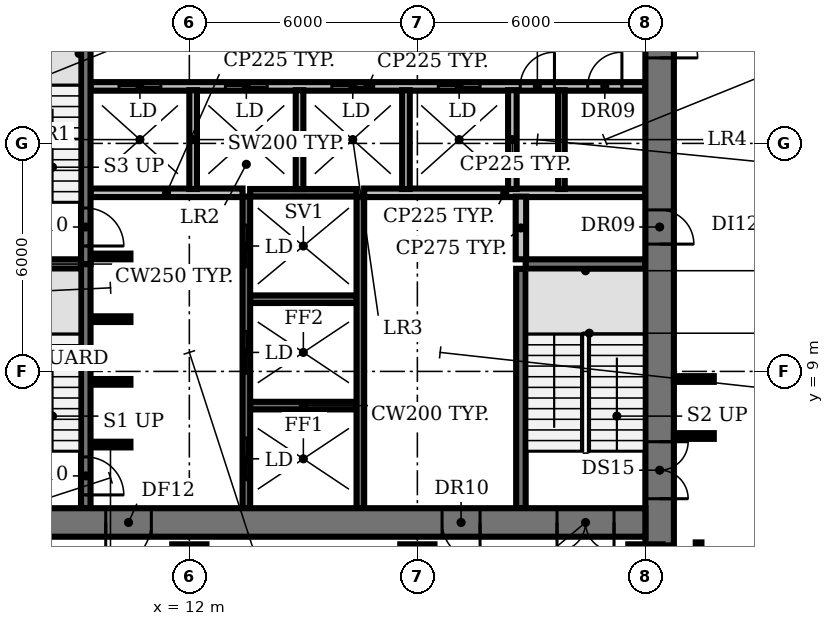
"""IFC4 building model, lengths in metres.
Left out: names, types, materials, properties, quantities, classifications, styles, units other than length and angle.
Written with IfcOpenShell. Run it as: python <this file> out.ifc"""

import sys

from ifc_helpers import new_model, si_unit, direction, frame, frame_2d, origin, origin_2d, place, context, subcontext, project, spatial, rectangle, extrude, element, fill, save


model = new_model("IFC4")
c1 = context("Model", 3, precision=1e-05, world=origin(), true_north=direction((0.0, 1.0)))
c2 = subcontext(c1, "Body", "Model", "MODEL_VIEW")
j1 = project(units=[si_unit("LENGTHUNIT", "METRE"), si_unit("PLANEANGLEUNIT", "RADIAN")], contexts=[c1])
p1 = place(None, origin())
s1 = spatial("IfcSite", under=j1, at=p1, CompositionType="ELEMENT")
p2 = place(p1, origin())
s2 = spatial("IfcBuilding", under=s1, at=p2, CompositionType="ELEMENT")
p3 = place(p2, frame((0.0, 0.0, 108.8)))
s3 = spatial("IfcBuildingStorey", under=s2, at=p3, CompositionType="ELEMENT", Elevation=108.8)
for number, where, z_axis, x_axis in (
    (1, (12.0, 4.0, 0.0), (0.0, 0.0, 1.0), (1.0, 0.0, 0.0)),
    (2, (18.0, 4.0, 0.0), (0.0, 0.0, 1.0), (1.0, 0.0, 0.0)),
    (3, (24.0, 4.0, 0.0), (0.0, 0.0, 1.0), (1.0, 0.0, 0.0)),
):
    element("IfcColumn", number, at=place(p3, frame(where, z_axis=z_axis, x_axis=x_axis)), inside=s3, PredefinedType="COLUMN", context=c2, shape_type="SweptSolid", body=[
        extrude(rectangle(XDim=0.9, YDim=0.9, at=origin_2d()), origin(), (0.0, 0.0, 1.0), 3.85),
    ])
p4 = place(p3, frame((9.4, 7.075, 0.0), z_axis=(0.0, 0.0, 1.0), x_axis=(1.0, 0.0, 0.0)))
e4 = element("IfcWall", 4, at=p4, inside=s3, PredefinedType="SHEAR", context=c2, shape_type="SweptSolid", body=[
    extrude(rectangle(XDim=1.05, YDim=0.15, at=frame_2d((0.525, 0.0))), origin(), (0.0, 0.0, 1.0), 3.85),
])
p5 = place(p3, frame((13.6, 8.1, 0.0), z_axis=(0.0, 0.0, 1.0), x_axis=(1.0, 0.0, 0.0)))
e5 = element("IfcWall", 5, at=p5, inside=s3, PredefinedType="SHEAR", context=c2, shape_type="SweptSolid", body=[
    extrude(rectangle(XDim=2.8, YDim=0.2, at=frame_2d((1.4, 0.0))), origin(), (0.0, 0.0, 1.0), 3.85),
])
for number, where, z_axis, x_axis in (
    (6, (9.4, 8.725, 0.0), (0.0, 0.0, 1.0), (1.0, 0.0, 0.0)),
    (7, (9.4, 10.375, 0.0), (0.0, 0.0, 1.0), (1.0, 0.0, 0.0)),
):
    element("IfcWall", number, at=place(p3, frame(where, z_axis=z_axis, x_axis=x_axis)), inside=s3, PredefinedType="SHEAR", context=c2, shape_type="SweptSolid", body=[
        extrude(rectangle(XDim=1.05, YDim=0.15, at=frame_2d((0.525, 0.0))), origin(), (0.0, 0.0, 1.0), 3.85),
    ])
p6 = place(p3, frame((13.6, 10.9, 0.0), z_axis=(0.0, 0.0, 1.0), x_axis=(1.0, 0.0, 0.0)))
e8 = element("IfcWall", 8, at=p6, inside=s3, PredefinedType="SHEAR", context=c2, shape_type="SweptSolid", body=[
    extrude(rectangle(XDim=2.8, YDim=0.2, at=frame_2d((1.4, 0.0))), origin(), (0.0, 0.0, 1.0), 3.85),
])
for number, where, z_axis, x_axis in (
    (9, (6.0, 11.825, 0.0), (0.0, 0.0, 1.0), (1.0, 0.0, 0.0)),
    (10, (20.85, 11.825, 0.0), (0.0, 0.0, 1.0), (1.0, 0.0, 0.0)),
):
    element("IfcWall", number, at=place(p3, frame(where, z_axis=z_axis, x_axis=x_axis)), inside=s3, PredefinedType="SHEAR", context=c2, shape_type="SweptSolid", body=[
        extrude(rectangle(XDim=3.15, YDim=0.25, at=frame_2d((1.575, 0.0))), origin(), (0.0, 0.0, 1.0), 3.85),
    ])
p7 = place(p3, frame((9.4, 12.025, 0.0), z_axis=(0.0, 0.0, 1.0), x_axis=(1.0, 0.0, 0.0)))
e11 = element("IfcWall", 11, at=p7, inside=s3, PredefinedType="SHEAR", context=c2, shape_type="SweptSolid", body=[
    extrude(rectangle(XDim=1.05, YDim=0.15, at=frame_2d((0.525, 0.0))), origin(), (0.0, 0.0, 1.0), 3.85),
])
p8 = place(p3, frame((9.4, 13.7, 0.0), z_axis=(0.0, 0.0, 1.0), x_axis=(1.0, 0.0, 0.0)))
e12 = element("IfcWall", 12, at=p8, inside=s3, PredefinedType="PARTITIONING", context=c2, shape_type="SweptSolid", body=[
    extrude(rectangle(XDim=4.0, YDim=0.225, at=frame_2d((2.0, 0.0))), origin(), (0.0, 0.0, 1.0), 3.85),
])
p9 = place(p3, frame((13.6, 13.7, 0.0), z_axis=(0.0, 0.0, 1.0), x_axis=(1.0, 0.0, 0.0)))
e13 = element("IfcWall", 13, at=p9, inside=s3, PredefinedType="SHEAR", context=c2, shape_type="SweptSolid", body=[
    extrude(rectangle(XDim=2.8, YDim=0.2, at=frame_2d((1.4, 0.0))), origin(), (0.0, 0.0, 1.0), 3.85),
])
p10 = place(p3, frame((16.6, 13.7, 0.0), z_axis=(0.0, 0.0, 1.0), x_axis=(1.0, 0.0, 0.0)))
e14 = element("IfcWall", 14, at=p10, inside=s3, PredefinedType="PARTITIONING", context=c2, shape_type="SweptSolid", body=[
    extrude(rectangle(XDim=7.4, YDim=0.225, at=frame_2d((3.7, 0.0))), origin(), (0.0, 0.0, 1.0), 3.85),
])
p11 = place(p3, frame((9.4, 16.5, 0.0), z_axis=(0.0, 0.0, 1.0), x_axis=(1.0, 0.0, 0.0)))
e15 = element("IfcWall", 15, at=p11, inside=s3, PredefinedType="PARTITIONING", context=c2, shape_type="SweptSolid", body=[
    extrude(rectangle(XDim=14.6, YDim=0.225, at=frame_2d((7.3, 0.0))), origin(), (0.0, 0.0, 1.0), 3.85),
])
p12 = place(p11, frame((0.75, 0.0, 0.0)))
e16 = element("IfcOpeningElement", 16, at=p12, cuts=e15, PredefinedType="OPENING", context=c2, shape_type="SweptSolid", body=[
    extrude(rectangle(XDim=1.1, YDim=2.1, at=frame_2d((0.55, 1.05))), frame((0.0, 0.123, 0.0), z_axis=(0.0, -1.0, 0.0), x_axis=(1.0, 0.0, 0.0)), (0.0, 0.0, 1.0), 0.245),
])
p13 = place(p11, frame((3.55, 0.0, 0.0)))
e17 = element("IfcOpeningElement", 17, at=p13, cuts=e15, PredefinedType="OPENING", context=c2, shape_type="SweptSolid", body=[
    extrude(rectangle(XDim=1.1, YDim=2.1, at=frame_2d((0.55, 1.05))), frame((0.0, 0.123, 0.0), z_axis=(0.0, -1.0, 0.0), x_axis=(1.0, 0.0, 0.0)), (0.0, 0.0, 1.0), 0.245),
])
p14 = place(p11, frame((6.35, 0.0, 0.0)))
e18 = element("IfcOpeningElement", 18, at=p14, cuts=e15, PredefinedType="OPENING", context=c2, shape_type="SweptSolid", body=[
    extrude(rectangle(XDim=1.1, YDim=2.1, at=frame_2d((0.55, 1.05))), frame((0.0, 0.123, 0.0), z_axis=(0.0, -1.0, 0.0), x_axis=(1.0, 0.0, 0.0)), (0.0, 0.0, 1.0), 0.245),
])
p15 = place(p11, frame((9.15, 0.0, 0.0)))
e19 = element("IfcOpeningElement", 19, at=p15, cuts=e15, PredefinedType="OPENING", context=c2, shape_type="SweptSolid", body=[
    extrude(rectangle(XDim=1.1, YDim=2.1, at=frame_2d((0.55, 1.05))), frame((0.0, 0.123, 0.0), z_axis=(0.0, -1.0, 0.0), x_axis=(1.0, 0.0, 0.0)), (0.0, 0.0, 1.0), 0.245),
])
p16 = place(p11, frame((11.308, 0.0, 0.0)))
e20 = element("IfcOpeningElement", 20, at=p16, cuts=e15, PredefinedType="OPENING", context=c2, shape_type="SweptSolid", body=[
    extrude(rectangle(XDim=0.9, YDim=2.1, at=frame_2d((0.45, 1.05))), frame((0.0, 0.123, 0.0), z_axis=(0.0, -1.0, 0.0), x_axis=(1.0, 0.0, 0.0)), (0.0, 0.0, 1.0), 0.245),
])
p17 = place(p11, frame((13.083, 0.0, 0.0)))
e21 = element("IfcOpeningElement", 21, at=p17, cuts=e15, PredefinedType="OPENING", context=c2, shape_type="SweptSolid", body=[
    extrude(rectangle(XDim=0.9, YDim=2.1, at=frame_2d((0.45, 1.05))), frame((0.0, 0.123, 0.0), z_axis=(0.0, -1.0, 0.0), x_axis=(1.0, 0.0, 0.0)), (0.0, 0.0, 1.0), 0.245),
])
p18 = place(p3, frame((9.275, 11.825, 0.0), z_axis=(0.0, 0.0, 1.0), x_axis=(0.0, -1.0, 0.0)))
e22 = element("IfcWall", 22, at=p18, inside=s3, PredefinedType="SHEAR", context=c2, shape_type="SweptSolid", body=[
    extrude(rectangle(XDim=6.425, YDim=0.25, at=frame_2d((3.212, 0.0))), origin(), (0.0, 0.0, 1.0), 3.85),
])
p19 = place(p18, frame((5.075, 0.0, 0.0)))
e23 = element("IfcOpeningElement", 23, at=p19, cuts=e22, PredefinedType="OPENING", context=c2, shape_type="SweptSolid", body=[
    extrude(rectangle(XDim=1.0, YDim=2.1, at=frame_2d((0.5, 1.05))), frame((0.0, 0.135, 0.0), z_axis=(0.0, -1.0, 0.0), x_axis=(1.0, 0.0, 0.0)), (0.0, 0.0, 1.0), 0.27),
])
p20 = place(p3, frame((9.275, 18.375, 0.0), z_axis=(0.0, 0.0, 1.0), x_axis=(0.0, -1.0, 0.0)))
e24 = element("IfcWall", 24, at=p20, inside=s3, PredefinedType="SHEAR", context=c2, shape_type="SweptSolid", body=[
    extrude(rectangle(XDim=6.55, YDim=0.25, at=frame_2d((3.275, 0.0))), origin(), (0.0, 0.0, 1.0), 3.85),
])
p21 = place(p20, frame((5.075, 0.0, 0.0)))
e25 = element("IfcOpeningElement", 25, at=p21, cuts=e24, PredefinedType="OPENING", context=c2, shape_type="SweptSolid", body=[
    extrude(rectangle(XDim=1.0, YDim=2.1, at=frame_2d((0.5, 1.05))), frame((0.0, 0.135, 0.0), z_axis=(0.0, -1.0, 0.0), x_axis=(1.0, 0.0, 0.0)), (0.0, 0.0, 1.0), 0.27),
])
p22 = place(p3, frame((12.1, 13.8, 0.0), z_axis=(0.0, 0.0, 1.0), x_axis=(0.0, 1.0, 0.0)))
e26 = element("IfcWall", 26, at=p22, inside=s3, PredefinedType="SOLIDWALL", context=c2, shape_type="SweptSolid", body=[
    extrude(rectangle(XDim=2.6, YDim=0.2, at=frame_2d((1.3, 0.0))), origin(), (0.0, 0.0, 1.0), 3.85),
])
p23 = place(p3, frame((13.5, 5.4, 0.0), z_axis=(0.0, 0.0, 1.0), x_axis=(0.0, 1.0, 0.0)))
e27 = element("IfcWall", 27, at=p23, inside=s3, PredefinedType="SHEAR", context=c2, shape_type="SweptSolid", body=[
    extrude(rectangle(XDim=8.2, YDim=0.2, at=frame_2d((4.1, 0.0))), origin(), (0.0, 0.0, 1.0), 3.85),
])
p24 = place(p23, frame((0.75, 0.0, 0.0)))
e28 = element("IfcOpeningElement", 28, at=p24, cuts=e27, PredefinedType="OPENING", context=c2, shape_type="SweptSolid", body=[
    extrude(rectangle(XDim=1.1, YDim=2.1, at=frame_2d((0.55, 1.05))), frame((0.0, 0.11, 0.0), z_axis=(0.0, -1.0, 0.0), x_axis=(1.0, 0.0, 0.0)), (0.0, 0.0, 1.0), 0.22),
])
p25 = place(p23, frame((3.55, 0.0, 0.0)))
e29 = element("IfcOpeningElement", 29, at=p25, cuts=e27, PredefinedType="OPENING", context=c2, shape_type="SweptSolid", body=[
    extrude(rectangle(XDim=1.1, YDim=2.1, at=frame_2d((0.55, 1.05))), frame((0.0, 0.11, 0.0), z_axis=(0.0, -1.0, 0.0), x_axis=(1.0, 0.0, 0.0)), (0.0, 0.0, 1.0), 0.22),
])
p26 = place(p23, frame((6.35, 0.0, 0.0)))
e30 = element("IfcOpeningElement", 30, at=p26, cuts=e27, PredefinedType="OPENING", context=c2, shape_type="SweptSolid", body=[
    extrude(rectangle(XDim=1.1, YDim=2.1, at=frame_2d((0.55, 1.05))), frame((0.0, 0.11, 0.0), z_axis=(0.0, -1.0, 0.0), x_axis=(1.0, 0.0, 0.0)), (0.0, 0.0, 1.0), 0.22),
])
p27 = place(p3, frame((14.9, 13.8, 0.0), z_axis=(0.0, 0.0, 1.0), x_axis=(0.0, 1.0, 0.0)))
e31 = element("IfcWall", 31, at=p27, inside=s3, PredefinedType="SOLIDWALL", context=c2, shape_type="SweptSolid", body=[
    extrude(rectangle(XDim=2.6, YDim=0.2, at=frame_2d((1.3, 0.0))), origin(), (0.0, 0.0, 1.0), 3.85),
])
p28 = place(p3, frame((16.5, 5.4, 0.0), z_axis=(0.0, 0.0, 1.0), x_axis=(0.0, 1.0, 0.0)))
e32 = element("IfcWall", 32, at=p28, inside=s3, PredefinedType="SHEAR", context=c2, shape_type="SweptSolid", body=[
    extrude(rectangle(XDim=8.2, YDim=0.2, at=frame_2d((4.1, 0.0))), origin(), (0.0, 0.0, 1.0), 3.85),
])
p29 = place(p3, frame((17.7, 13.8, 0.0), z_axis=(0.0, 0.0, 1.0), x_axis=(0.0, 1.0, 0.0)))
e33 = element("IfcWall", 33, at=p29, inside=s3, PredefinedType="SOLIDWALL", context=c2, shape_type="SweptSolid", body=[
    extrude(rectangle(XDim=2.6, YDim=0.2, at=frame_2d((1.3, 0.0))), origin(), (0.0, 0.0, 1.0), 3.85),
])
p30 = place(p3, frame((20.5, 13.8, 0.0), z_axis=(0.0, 0.0, 1.0), x_axis=(0.0, 1.0, 0.0)))
e34 = element("IfcWall", 34, at=p30, inside=s3, PredefinedType="PARTITIONING", context=c2, shape_type="SweptSolid", body=[
    extrude(rectangle(XDim=2.6, YDim=0.225, at=frame_2d((1.3, 0.0))), origin(), (0.0, 0.0, 1.0), 3.85),
])
p31 = place(p3, frame((20.725, 5.4, 0.0), z_axis=(0.0, 0.0, 1.0), x_axis=(0.0, 1.0, 0.0)))
e35 = element("IfcWall", 35, at=p31, inside=s3, PredefinedType="SHEAR", context=c2, shape_type="SweptSolid", body=[
    extrude(rectangle(XDim=6.3, YDim=0.25, at=frame_2d((3.15, 0.0))), origin(), (0.0, 0.0, 1.0), 3.85),
])
p32 = place(p3, frame((20.725, 11.95, 0.0), z_axis=(0.0, 0.0, 1.0), x_axis=(0.0, 1.0, 0.0)))
e36 = element("IfcWall", 36, at=p32, inside=s3, PredefinedType="PARTITIONING", context=c2, shape_type="SweptSolid", body=[
    extrude(rectangle(XDim=1.65, YDim=0.275, at=frame_2d((0.825, 0.0))), origin(), (0.0, 0.0, 1.0), 3.85),
])
p33 = place(p3, frame((21.79, 13.8, 0.0), z_axis=(0.0, 0.0, 1.0), x_axis=(0.0, 1.0, 0.0)))
e37 = element("IfcWall", 37, at=p33, inside=s3, PredefinedType="PARTITIONING", context=c2, shape_type="SweptSolid", body=[
    extrude(rectangle(XDim=2.6, YDim=0.175, at=frame_2d((1.3, 0.0))), origin(), (0.0, 0.0, 1.0), 3.85),
])
p34 = place(p3, frame((24.375, 25.55, 0.0), z_axis=(0.0, 0.0, 1.0), x_axis=(0.0, -1.0, 0.0)))
e38 = element("IfcWall", 38, at=p34, inside=s3, PredefinedType="SHEAR", context=c2, shape_type="SweptSolid", body=[
    extrude(rectangle(XDim=21.13, YDim=0.75, at=frame_2d((10.565, 0.0))), origin(), (0.0, 0.0, 1.0), 3.85),
])
p35 = place(p34, frame((18.4, 0.0, 0.0)))
e39 = element("IfcOpeningElement", 39, at=p35, cuts=e38, PredefinedType="OPENING", context=c2, shape_type="SweptSolid", body=[
    extrude(rectangle(XDim=1.5, YDim=2.1, at=frame_2d((0.75, 1.05))), frame((0.0, 0.385, 0.0), z_axis=(0.0, -1.0, 0.0), x_axis=(1.0, 0.0, 0.0)), (0.0, 0.0, 1.0), 0.77),
])
p36 = place(p34, frame((12.3, 0.0, 0.0)))
e40 = element("IfcOpeningElement", 40, at=p36, cuts=e38, PredefinedType="OPENING", context=c2, shape_type="SweptSolid", body=[
    extrude(rectangle(XDim=0.9, YDim=2.1, at=frame_2d((0.45, 1.05))), frame((0.0, 0.385, 0.0), z_axis=(0.0, -1.0, 0.0), x_axis=(1.0, 0.0, 0.0)), (0.0, 0.0, 1.0), 0.77),
])
p37 = place(p34, frame((6.3, 0.0, 0.0)))
e41 = element("IfcOpeningElement", 41, at=p37, cuts=e38, PredefinedType="OPENING", context=c2, shape_type="SweptSolid", body=[
    extrude(rectangle(XDim=2.0, YDim=2.1, at=frame_2d((1.0, 1.05))), frame((0.0, 0.385, 0.0), z_axis=(0.0, -1.0, 0.0), x_axis=(1.0, 0.0, 0.0)), (0.0, 0.0, 1.0), 0.77),
])
p38 = place(p3, frame((24.0, 5.025, 0.0), z_axis=(0.0, 0.0, 1.0), x_axis=(-1.0, 0.0, 0.0)))
e42 = element("IfcWall", 42, at=p38, inside=s3, PredefinedType="SHEAR", context=c2, shape_type="SweptSolid", body=[
    extrude(rectangle(XDim=18.0, YDim=0.75, at=frame_2d((9.0, 0.0))), origin(), (0.0, 0.0, 1.0), 3.85),
])
p39 = place(p38, frame((0.825, 0.0, 0.0)))
e43 = element("IfcOpeningElement", 43, at=p39, cuts=e42, PredefinedType="OPENING", context=c2, shape_type="SweptSolid", body=[
    extrude(rectangle(XDim=1.5, YDim=2.1, at=frame_2d((0.75, 1.05))), frame((0.0, 0.385, 0.0), z_axis=(0.0, -1.0, 0.0), x_axis=(1.0, 0.0, 0.0)), (0.0, 0.0, 1.0), 0.77),
])
p40 = place(p38, frame((15.675, 0.0, 0.0)))
e44 = element("IfcOpeningElement", 44, at=p40, cuts=e42, PredefinedType="OPENING", context=c2, shape_type="SweptSolid", body=[
    extrude(rectangle(XDim=1.5, YDim=2.1, at=frame_2d((0.75, 1.05))), frame((0.0, 0.385, 0.0), z_axis=(0.0, -1.0, 0.0), x_axis=(1.0, 0.0, 0.0)), (0.0, 0.0, 1.0), 0.77),
])
p41 = place(p38, frame((13.0, 0.0, 0.0)))
e45 = element("IfcOpeningElement", 45, at=p41, cuts=e42, PredefinedType="OPENING", context=c2, shape_type="SweptSolid", body=[
    extrude(rectangle(XDim=1.2, YDim=2.1, at=frame_2d((0.6, 1.05))), frame((0.0, 0.385, 0.0), z_axis=(0.0, -1.0, 0.0), x_axis=(1.0, 0.0, 0.0)), (0.0, 0.0, 1.0), 0.77),
])
p42 = place(p38, frame((4.35, 0.0, 0.0)))
e46 = element("IfcOpeningElement", 46, at=p42, cuts=e42, PredefinedType="OPENING", context=c2, shape_type="SweptSolid", body=[
    extrude(rectangle(XDim=1.0, YDim=2.1, at=frame_2d((0.5, 1.05))), frame((0.0, 0.385, 0.0), z_axis=(0.0, -1.0, 0.0), x_axis=(1.0, 0.0, 0.0)), (0.0, 0.0, 1.0), 0.77),
])
for number, where, z_axis, x_axis in (
    (47, (24.75, 7.3, 0.0), (0.0, 0.0, 1.0), (1.0, 0.0, 0.0)),
    (48, (24.75, 8.8, 0.0), (0.0, 0.0, 1.0), (1.0, 0.0, 0.0)),
):
    element("IfcWall", number, at=place(p3, frame(where, z_axis=z_axis, x_axis=x_axis)), inside=s3, PredefinedType="PARTITIONING", context=c2, shape_type="SweptSolid", body=[
        extrude(rectangle(XDim=1.05, YDim=0.15, at=frame_2d((0.525, 0.0))), origin(), (0.0, 0.0, 1.0), 2.83),
    ])
p43 = place(p3, frame((25.4, 3.02, 0.0), z_axis=(0.0, 0.0, 1.0), x_axis=(0.0, 1.0, 0.0)))
e49 = element("IfcWall", 49, at=p43, inside=s3, PredefinedType="PARTITIONING", context=c2, shape_type="SweptSolid", body=[
    extrude(rectangle(XDim=1.48, YDim=0.15, at=frame_2d((0.74, 0.0))), origin(), (0.0, 0.0, 1.0), 2.83),
])
p44 = place(p12, origin())
e50 = element("IfcDoor", 50, at=p44, inside=s3, OperationType="DOUBLE_DOOR_SLIDING", PredefinedType="DOOR", context=c2, shape_type="SweptSolid", body=[
    extrude(rectangle(XDim=1.1, YDim=2.1, at=frame_2d((0.55, 1.05))), frame((0.0, 0.025, 0.0), z_axis=(0.0, -1.0, 0.0), x_axis=(1.0, 0.0, 0.0)), (0.0, 0.0, 1.0), 0.05),
])
fill(e16, e50)
p45 = place(p13, origin())
e51 = element("IfcDoor", 51, at=p45, inside=s3, OperationType="DOUBLE_DOOR_SLIDING", PredefinedType="DOOR", context=c2, shape_type="SweptSolid", body=[
    extrude(rectangle(XDim=1.1, YDim=2.1, at=frame_2d((0.55, 1.05))), frame((0.0, 0.025, 0.0), z_axis=(0.0, -1.0, 0.0), x_axis=(1.0, 0.0, 0.0)), (0.0, 0.0, 1.0), 0.05),
])
fill(e17, e51)
p46 = place(p14, origin())
e52 = element("IfcDoor", 52, at=p46, inside=s3, OperationType="DOUBLE_DOOR_SLIDING", PredefinedType="DOOR", context=c2, shape_type="SweptSolid", body=[
    extrude(rectangle(XDim=1.1, YDim=2.1, at=frame_2d((0.55, 1.05))), frame((0.0, 0.025, 0.0), z_axis=(0.0, -1.0, 0.0), x_axis=(1.0, 0.0, 0.0)), (0.0, 0.0, 1.0), 0.05),
])
fill(e18, e52)
p47 = place(p15, origin())
e53 = element("IfcDoor", 53, at=p47, inside=s3, OperationType="DOUBLE_DOOR_SLIDING", PredefinedType="DOOR", context=c2, shape_type="SweptSolid", body=[
    extrude(rectangle(XDim=1.1, YDim=2.1, at=frame_2d((0.55, 1.05))), frame((0.0, 0.025, 0.0), z_axis=(0.0, -1.0, 0.0), x_axis=(1.0, 0.0, 0.0)), (0.0, 0.0, 1.0), 0.05),
])
fill(e19, e53)
p48 = place(p16, origin())
e54 = element("IfcDoor", 54, at=p48, inside=s3, OperationType="SINGLE_SWING_RIGHT", PredefinedType="DOOR", context=c2, shape_type="SweptSolid", body=[
    extrude(rectangle(XDim=0.9, YDim=2.1, at=frame_2d((0.45, 1.05))), frame((0.0, 0.025, 0.0), z_axis=(0.0, -1.0, 0.0), x_axis=(1.0, 0.0, 0.0)), (0.0, 0.0, 1.0), 0.05),
])
fill(e20, e54)
p49 = place(p17, origin())
e55 = element("IfcDoor", 55, at=p49, inside=s3, OperationType="SINGLE_SWING_RIGHT", PredefinedType="DOOR", context=c2, shape_type="SweptSolid", body=[
    extrude(rectangle(XDim=0.9, YDim=2.1, at=frame_2d((0.45, 1.05))), frame((0.0, 0.025, 0.0), z_axis=(0.0, -1.0, 0.0), x_axis=(1.0, 0.0, 0.0)), (0.0, 0.0, 1.0), 0.05),
])
fill(e21, e55)
p50 = place(p19, origin())
e56 = element("IfcDoor", 56, at=p50, inside=s3, OperationType="SINGLE_SWING_RIGHT", PredefinedType="DOOR", context=c2, shape_type="SweptSolid", body=[
    extrude(rectangle(XDim=1.0, YDim=2.1, at=frame_2d((0.5, 1.05))), frame((0.0, 0.025, 0.0), z_axis=(0.0, -1.0, 0.0), x_axis=(1.0, 0.0, 0.0)), (0.0, 0.0, 1.0), 0.05),
])
fill(e23, e56)
p51 = place(p21, origin())
e57 = element("IfcDoor", 57, at=p51, inside=s3, OperationType="SINGLE_SWING_RIGHT", PredefinedType="DOOR", context=c2, shape_type="SweptSolid", body=[
    extrude(rectangle(XDim=1.0, YDim=2.1, at=frame_2d((0.5, 1.05))), frame((0.0, 0.025, 0.0), z_axis=(0.0, -1.0, 0.0), x_axis=(1.0, 0.0, 0.0)), (0.0, 0.0, 1.0), 0.05),
])
fill(e25, e57)
p52 = place(p24, origin())
e58 = element("IfcDoor", 58, at=p52, inside=s3, OperationType="DOUBLE_DOOR_SLIDING", PredefinedType="DOOR", context=c2, shape_type="SweptSolid", body=[
    extrude(rectangle(XDim=1.1, YDim=2.1, at=frame_2d((0.55, 1.05))), frame((0.0, 0.025, 0.0), z_axis=(0.0, -1.0, 0.0), x_axis=(1.0, 0.0, 0.0)), (0.0, 0.0, 1.0), 0.05),
])
fill(e28, e58)
p53 = place(p25, origin())
e59 = element("IfcDoor", 59, at=p53, inside=s3, OperationType="DOUBLE_DOOR_SLIDING", PredefinedType="DOOR", context=c2, shape_type="SweptSolid", body=[
    extrude(rectangle(XDim=1.1, YDim=2.1, at=frame_2d((0.55, 1.05))), frame((0.0, 0.025, 0.0), z_axis=(0.0, -1.0, 0.0), x_axis=(1.0, 0.0, 0.0)), (0.0, 0.0, 1.0), 0.05),
])
fill(e29, e59)
p54 = place(p26, origin())
e60 = element("IfcDoor", 60, at=p54, inside=s3, OperationType="DOUBLE_DOOR_SLIDING", PredefinedType="DOOR", context=c2, shape_type="SweptSolid", body=[
    extrude(rectangle(XDim=1.1, YDim=2.1, at=frame_2d((0.55, 1.05))), frame((0.0, 0.025, 0.0), z_axis=(0.0, -1.0, 0.0), x_axis=(1.0, 0.0, 0.0)), (0.0, 0.0, 1.0), 0.05),
])
fill(e30, e60)
p55 = place(p35, origin())
e61 = element("IfcDoor", 61, at=p55, inside=s3, OperationType="DOUBLE_DOOR_SINGLE_SWING", PredefinedType="DOOR", context=c2, shape_type="SweptSolid", body=[
    extrude(rectangle(XDim=1.5, YDim=2.1, at=frame_2d((0.75, 1.05))), frame((0.0, 0.025, 0.0), z_axis=(0.0, -1.0, 0.0), x_axis=(1.0, 0.0, 0.0)), (0.0, 0.0, 1.0), 0.05),
])
fill(e39, e61)
p56 = place(p36, origin())
e62 = element("IfcDoor", 62, at=p56, inside=s3, OperationType="SINGLE_SWING_RIGHT", PredefinedType="DOOR", context=c2, shape_type="SweptSolid", body=[
    extrude(rectangle(XDim=0.9, YDim=2.1, at=frame_2d((0.45, 1.05))), frame((0.0, -0.315, 0.0), z_axis=(0.0, -1.0, 0.0), x_axis=(1.0, 0.0, 0.0)), (0.0, 0.0, 1.0), 0.05),
])
fill(e40, e62)
p57 = place(p37, origin())
e63 = element("IfcDoor", 63, at=p57, inside=s3, OperationType="DOUBLE_DOOR_SINGLE_SWING", PredefinedType="DOOR", context=c2, shape_type="SweptSolid", body=[
    extrude(rectangle(XDim=2.0, YDim=2.1, at=frame_2d((1.0, 1.05))), frame((0.0, 0.025, 0.0), z_axis=(0.0, -1.0, 0.0), x_axis=(1.0, 0.0, 0.0)), (0.0, 0.0, 1.0), 0.05),
])
fill(e41, e63)
p58 = place(p39, origin())
e64 = element("IfcDoor", 64, at=p58, inside=s3, OperationType="DOUBLE_DOOR_SINGLE_SWING", PredefinedType="DOOR", context=c2, shape_type="SweptSolid", body=[
    extrude(rectangle(XDim=1.5, YDim=2.1, at=frame_2d((0.75, 1.05))), frame((0.0, 0.025, 0.0), z_axis=(0.0, -1.0, 0.0), x_axis=(1.0, 0.0, 0.0)), (0.0, 0.0, 1.0), 0.05),
])
fill(e43, e64)
p59 = place(p41, origin())
e65 = element("IfcDoor", 65, at=p59, inside=s3, OperationType="SINGLE_SWING_RIGHT", PredefinedType="DOOR", context=c2, shape_type="SweptSolid", body=[
    extrude(rectangle(XDim=1.2, YDim=2.1, at=frame_2d((0.6, 1.05))), frame((0.0, 0.025, 0.0), z_axis=(0.0, -1.0, 0.0), x_axis=(1.0, 0.0, 0.0)), (0.0, 0.0, 1.0), 0.05),
])
fill(e45, e65)
p60 = place(p42, origin())
e66 = element("IfcDoor", 66, at=p60, inside=s3, OperationType="SINGLE_SWING_LEFT", PredefinedType="DOOR", context=c2, shape_type="SweptSolid", body=[
    extrude(rectangle(XDim=1.0, YDim=2.1, at=frame_2d((0.5, 1.05))), frame((0.0, -0.315, 0.0), z_axis=(0.0, -1.0, 0.0), x_axis=(1.0, 0.0, 0.0)), (0.0, 0.0, 1.0), 0.05),
])
fill(e46, e66)
save(model, sys.argv[1])
